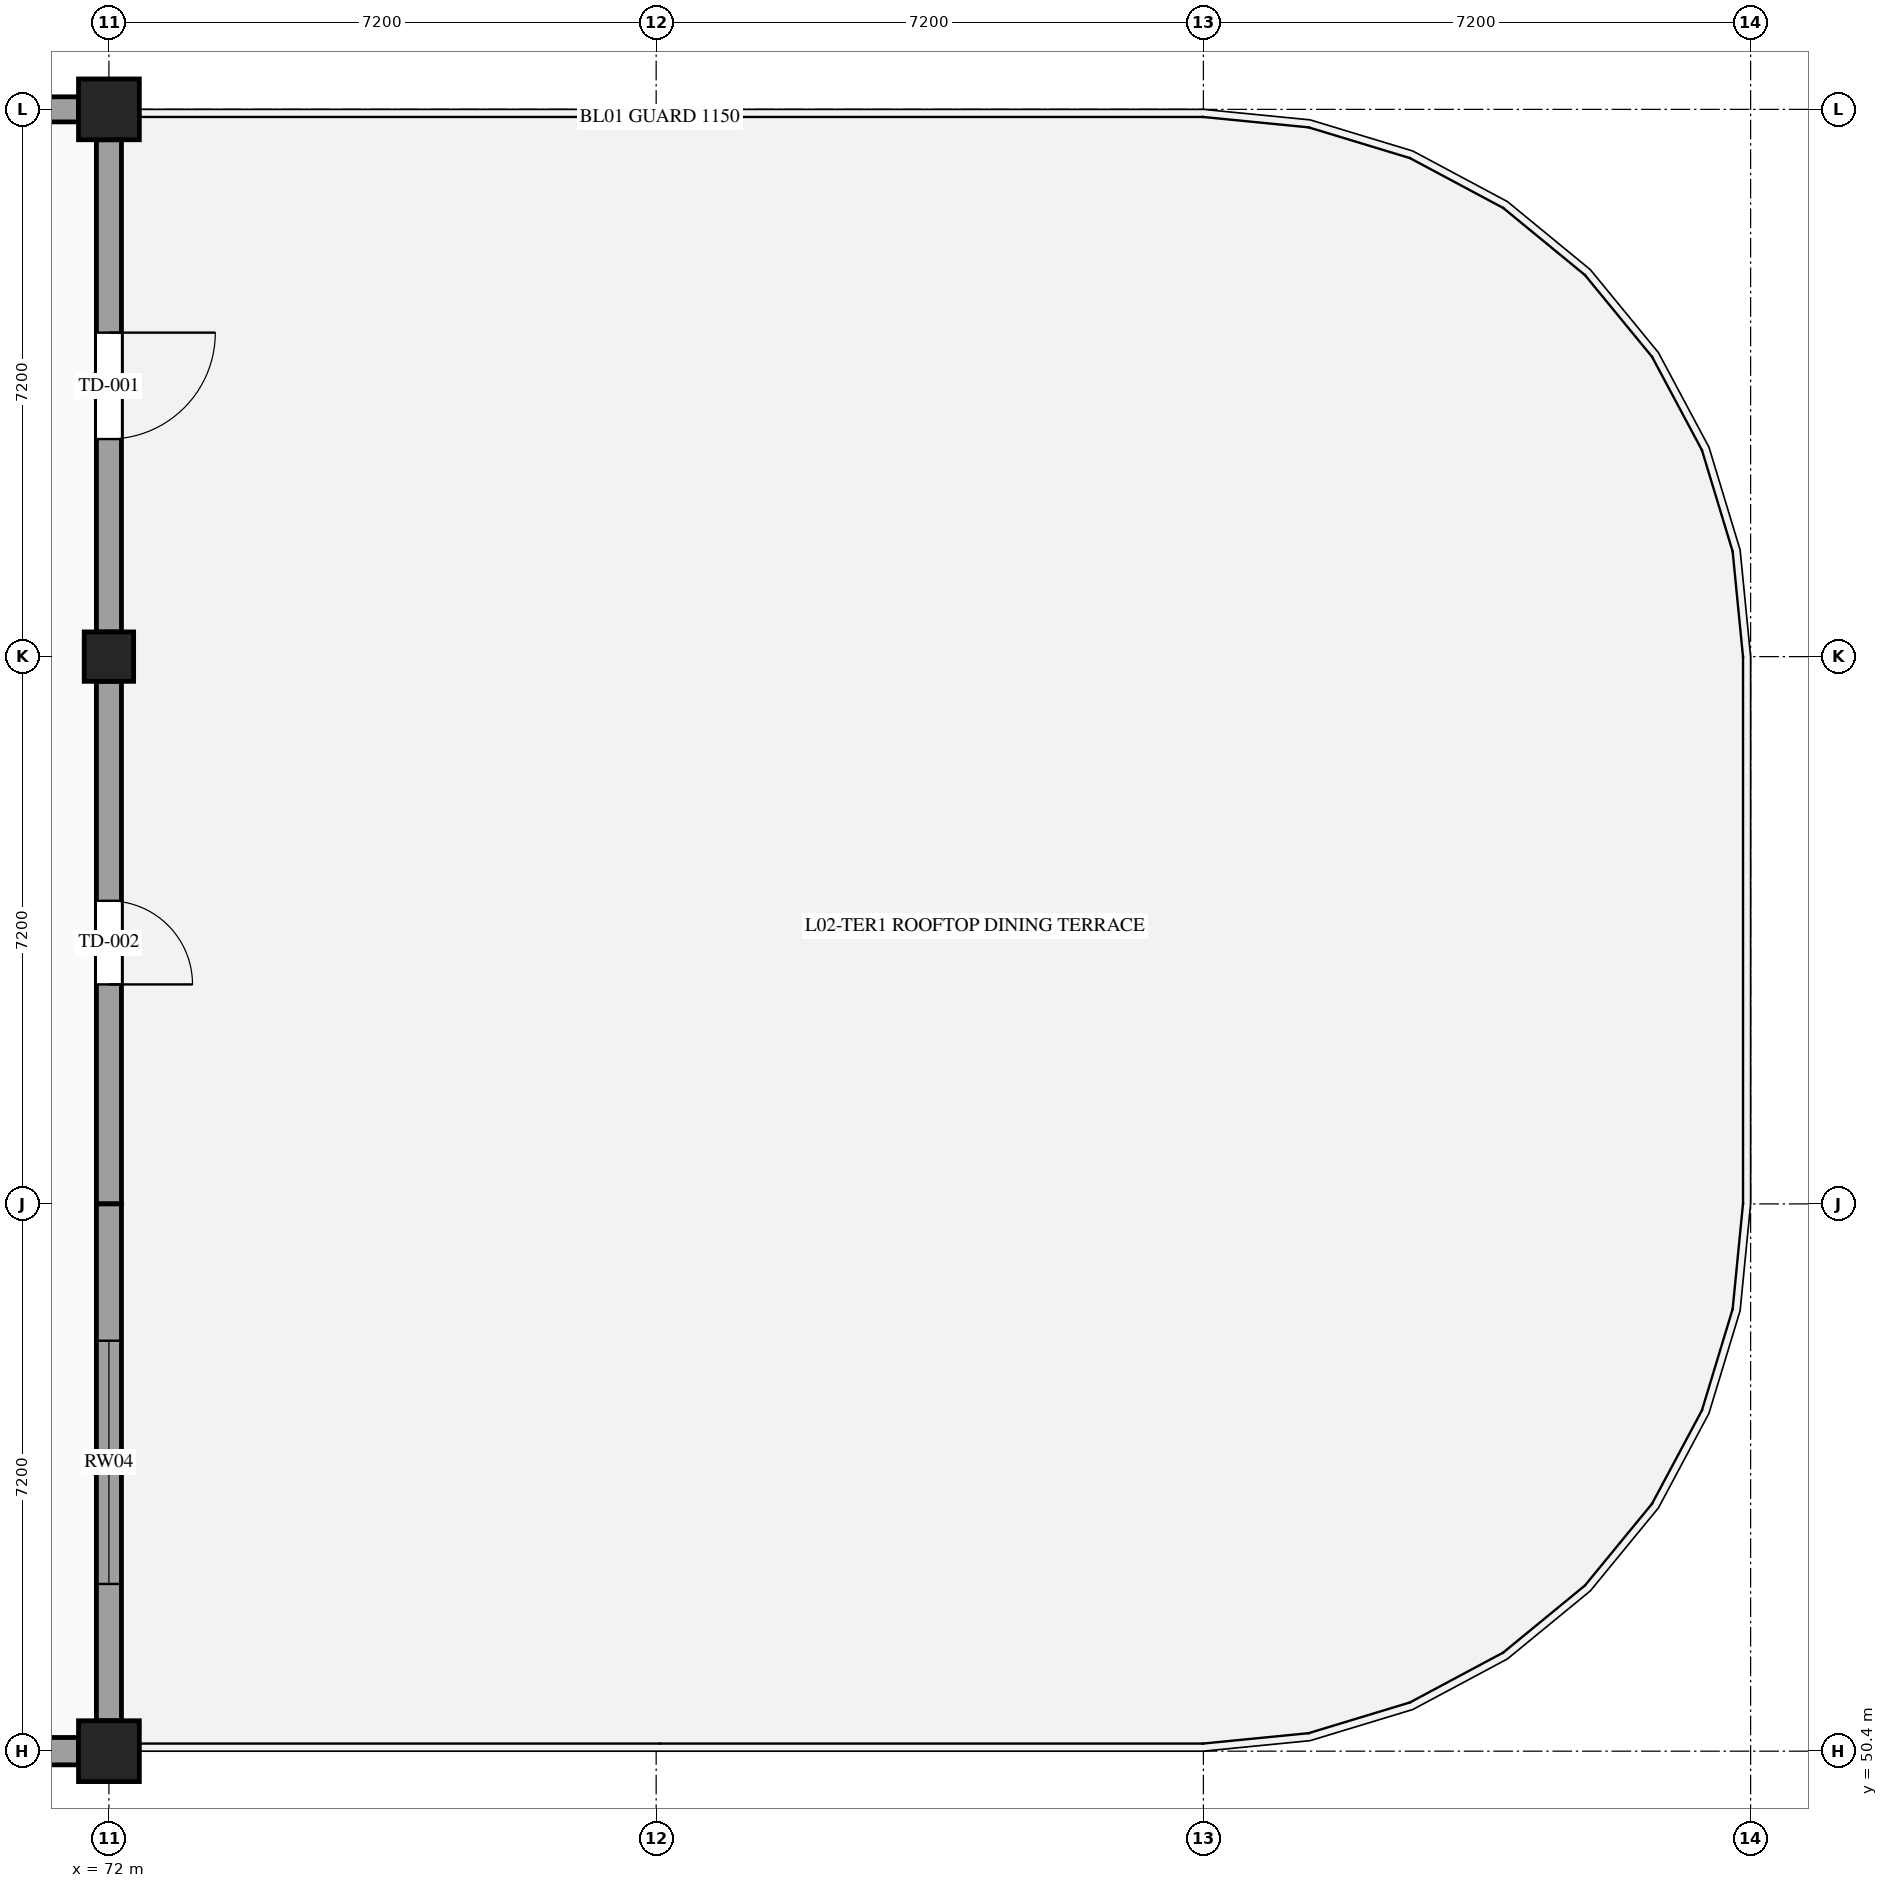
"""IFC4 building model, lengths in metres.
Left out: names, types, materials, properties, quantities, classifications, styles, units other than length and angle.
Written with IfcOpenShell. Run it as: python <this file> out.ifc"""

import sys

from ifc_helpers import new_model, si_unit, direction, frame, frame_2d, origin, origin_2d, place, context, subcontext, project, spatial, rectangle, circle, extrude, element, fill, save


model = new_model("IFC4")
c1 = context("Model", 3, precision=1e-05, world=origin(), true_north=direction((0.0, 1.0)))
c2 = subcontext(c1, "Body", "Model", "MODEL_VIEW")
j1 = project(units=[si_unit("LENGTHUNIT", "METRE"), si_unit("PLANEANGLEUNIT", "RADIAN")], contexts=[c1])
p1 = place(None, origin())
s1 = spatial("IfcSite", under=j1, at=p1, CompositionType="ELEMENT")
p2 = place(p1, origin())
s2 = spatial("IfcBuilding", under=s1, at=p2, CompositionType="ELEMENT")
p3 = place(p2, frame((0.0, 0.0, 9.9)))
s3 = spatial("IfcBuildingStorey", under=s2, at=p3, CompositionType="ELEMENT", Elevation=9.9)
p4 = place(p3, frame((72.0, 50.4, 0.0), z_axis=(0.0, 0.0, 1.0), x_axis=(1.0, 0.0, 0.0)))
e1 = element("IfcColumn", 1, at=p4, inside=s3, PredefinedType="COLUMN", context=c2, shape_type="SweptSolid", body=[
    extrude(circle(Radius=0.4, at=origin_2d()), origin(), (0.0, 0.0, 1.0), 4.5),
])
p5 = place(p3, frame((72.0, 64.8, 0.0), z_axis=(0.0, 0.0, 1.0), x_axis=(1.0, 0.0, 0.0)))
e2 = element("IfcColumn", 2, at=p5, inside=s3, PredefinedType="COLUMN", context=c2, shape_type="SweptSolid", body=[
    extrude(rectangle(XDim=0.65, YDim=0.65, at=origin_2d()), origin(), (0.0, 0.0, 1.0), 4.5),
])
p6 = place(p3, frame((72.0, 72.0, 0.0), z_axis=(0.0, 0.0, 1.0), x_axis=(1.0, 0.0, 0.0)))
e3 = element("IfcColumn", 3, at=p6, inside=s3, PredefinedType="COLUMN", context=c2, shape_type="SweptSolid", body=[
    extrude(circle(Radius=0.4, at=origin_2d()), origin(), (0.0, 0.0, 1.0), 4.5),
])
p7 = place(p3, frame((65.2, 72.0, 0.0), z_axis=(0.0, 0.0, 1.0), x_axis=(1.0, 0.0, 0.0)))
e4 = element("IfcWall", 4, at=p7, inside=s3, PredefinedType="STANDARD", context=c2, shape_type="SweptSolid", body=[
    extrude(rectangle(XDim=6.4, YDim=0.33, at=frame_2d((3.2, 0.0))), origin(), (0.0, 0.0, 1.0), 3.745),
])
p8 = place(p7, frame((1.1, 0.0, 0.98)))
e5 = element("IfcOpeningElement", 5, at=p8, cuts=e4, PredefinedType="OPENING", context=c2, shape_type="SweptSolid", body=[
    extrude(rectangle(XDim=4.2, YDim=1.5, at=frame_2d((2.1, 0.75))), frame((0.0, 0.175, 0.0), z_axis=(0.0, -1.0, 0.0), x_axis=(1.0, 0.0, 0.0)), (0.0, 0.0, 1.0), 0.35),
])
p9 = place(p3, frame((72.0, 71.6, 0.0), z_axis=(0.0, 0.0, 1.0), x_axis=(0.0, -1.0, 0.0)))
e6 = element("IfcWall", 6, at=p9, inside=s3, PredefinedType="STANDARD", context=c2, shape_type="SweptSolid", body=[
    extrude(rectangle(XDim=6.475, YDim=0.33, at=frame_2d((3.238, 0.0))), origin(), (0.0, 0.0, 1.0), 3.745),
])
p10 = place(p9, frame((2.538, 0.0, 0.0)))
e7 = element("IfcOpeningElement", 7, at=p10, cuts=e6, PredefinedType="OPENING", context=c2, shape_type="SweptSolid", body=[
    extrude(rectangle(XDim=1.4, YDim=2.25, at=frame_2d((0.7, 1.125))), frame((0.0, 0.175, 0.0), z_axis=(0.0, -1.0, 0.0), x_axis=(1.0, 0.0, 0.0)), (0.0, 0.0, 1.0), 0.35),
])
p11 = place(p3, frame((72.0, 64.475, 0.0), z_axis=(0.0, 0.0, 1.0), x_axis=(0.0, -1.0, 0.0)))
e8 = element("IfcWall", 8, at=p11, inside=s3, PredefinedType="STANDARD", context=c2, shape_type="SweptSolid", body=[
    extrude(rectangle(XDim=6.875, YDim=0.33, at=frame_2d((3.438, 0.0))), origin(), (0.0, 0.0, 1.0), 4.48),
])
p12 = place(p11, frame((2.887, 0.0, 0.0)))
e9 = element("IfcOpeningElement", 9, at=p12, cuts=e8, PredefinedType="OPENING", context=c2, shape_type="SweptSolid", body=[
    extrude(rectangle(XDim=1.1, YDim=2.2, at=frame_2d((0.55, 1.1))), frame((0.0, 0.175, 0.0), z_axis=(0.0, -1.0, 0.0), x_axis=(1.0, 0.0, 0.0)), (0.0, 0.0, 1.0), 0.35),
])
p13 = place(p3, frame((72.0, 57.6, 0.0), z_axis=(0.0, 0.0, 1.0), x_axis=(0.0, -1.0, 0.0)))
e10 = element("IfcWall", 10, at=p13, inside=s3, PredefinedType="STANDARD", context=c2, shape_type="SweptSolid", body=[
    extrude(rectangle(XDim=6.8, YDim=0.33, at=frame_2d((3.4, 0.0))), origin(), (0.0, 0.0, 1.0), 4.48),
])
p14 = place(p13, frame((1.8, 0.0, 0.95)))
e11 = element("IfcOpeningElement", 11, at=p14, cuts=e10, PredefinedType="OPENING", context=c2, shape_type="SweptSolid", body=[
    extrude(rectangle(XDim=3.2, YDim=1.45, at=frame_2d((1.6, 0.725))), frame((0.0, 0.175, 0.0), z_axis=(0.0, -1.0, 0.0), x_axis=(1.0, 0.0, 0.0)), (0.0, 0.0, 1.0), 0.35),
])
p15 = place(p3, frame((71.6, 50.4, 0.0), z_axis=(0.0, 0.0, 1.0), x_axis=(-1.0, 0.0, 0.0)))
e12 = element("IfcWall", 12, at=p15, inside=s3, PredefinedType="STANDARD", context=c2, shape_type="SweptSolid", body=[
    extrude(rectangle(XDim=6.4, YDim=0.36, at=frame_2d((3.2, 0.0))), origin(), (0.0, 0.0, 1.0), 3.745),
])
p16 = place(p15, frame((1.495, 0.0, 1.15)))
e13 = element("IfcOpeningElement", 13, at=p16, cuts=e12, PredefinedType="OPENING", context=c2, shape_type="SweptSolid", body=[
    extrude(rectangle(XDim=0.85, YDim=1.25, at=frame_2d((0.425, 0.625))), frame((0.0, 0.19, 0.0), z_axis=(0.0, -1.0, 0.0), x_axis=(1.0, 0.0, 0.0)), (0.0, 0.0, 1.0), 0.38),
])
p17 = place(p15, frame((4.055, 0.0, 1.15)))
e14 = element("IfcOpeningElement", 14, at=p17, cuts=e12, PredefinedType="OPENING", context=c2, shape_type="SweptSolid", body=[
    extrude(rectangle(XDim=0.85, YDim=1.25, at=frame_2d((0.425, 0.625))), frame((0.0, 0.19, 0.0), z_axis=(0.0, -1.0, 0.0), x_axis=(1.0, 0.0, 0.0)), (0.0, 0.0, 1.0), 0.38),
])
p18 = place(p10, origin())
e15 = element("IfcDoor", 15, at=p18, inside=s3, OperationType="SINGLE_SWING_LEFT", PredefinedType="DOOR", context=c2, shape_type="SweptSolid", body=[
    extrude(rectangle(XDim=1.4, YDim=2.25, at=frame_2d((0.7, 1.125))), frame((0.0, 0.025, 0.0), z_axis=(0.0, -1.0, 0.0), x_axis=(1.0, 0.0, 0.0)), (0.0, 0.0, 1.0), 0.05),
])
fill(e7, e15)
p19 = place(p12, origin())
e16 = element("IfcDoor", 16, at=p19, inside=s3, OperationType="SINGLE_SWING_RIGHT", PredefinedType="DOOR", context=c2, shape_type="SweptSolid", body=[
    extrude(rectangle(XDim=1.1, YDim=2.2, at=frame_2d((0.55, 1.1))), frame((0.0, 0.025, 0.0), z_axis=(0.0, -1.0, 0.0), x_axis=(1.0, 0.0, 0.0)), (0.0, 0.0, 1.0), 0.05),
])
fill(e9, e16)
p20 = place(p14, origin())
e17 = element("IfcWindow", 17, at=p20, inside=s3, PartitioningType="SINGLE_PANEL", PredefinedType="WINDOW", context=c2, shape_type="SweptSolid", body=[
    extrude(rectangle(XDim=3.2, YDim=1.45, at=frame_2d((1.6, 0.725))), frame((0.0, 0.03, 0.0), z_axis=(0.0, -1.0, 0.0), x_axis=(1.0, 0.0, 0.0)), (0.0, 0.0, 1.0), 0.06),
])
fill(e11, e17)
save(model, sys.argv[1])
